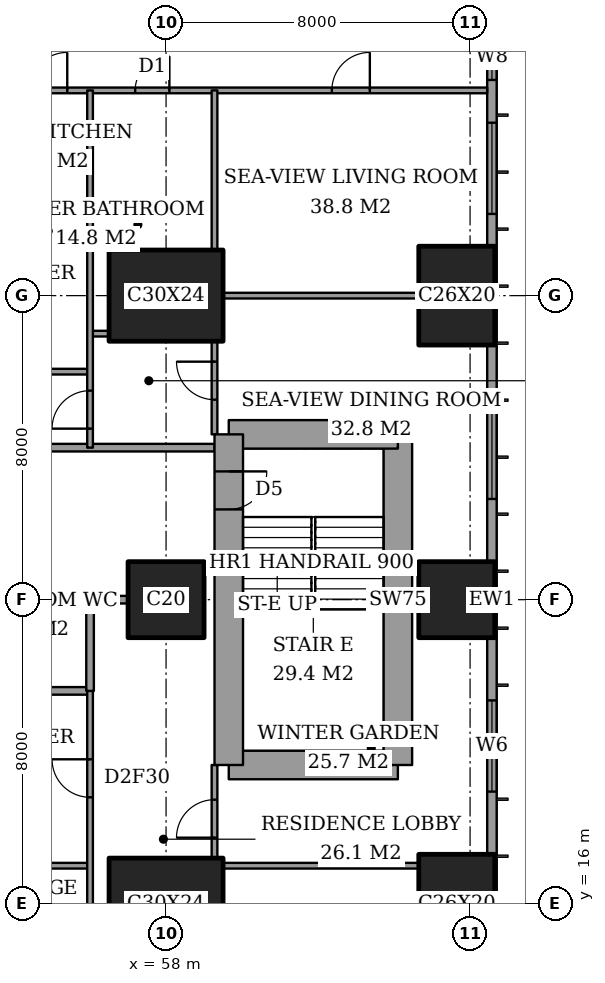
"""IFC4 building model, lengths in metres.
Left out: names, types, materials, properties, quantities, classifications, styles, units other than length and angle.
Written with IfcOpenShell. Run it as: python <this file> out.ifc"""

import sys

from ifc_helpers import new_model, si_unit, direction, frame, frame_2d, origin, origin_2d, place, context, subcontext, project, spatial, rectangle, extrude, element, fill, save


model = new_model("IFC4")
c1 = context("Model", 3, precision=1e-05, world=origin(), true_north=direction((0.0, 1.0)))
c2 = subcontext(c1, "Body", "Model", "MODEL_VIEW")
j1 = project(units=[si_unit("LENGTHUNIT", "METRE"), si_unit("PLANEANGLEUNIT", "RADIAN")], contexts=[c1])
p1 = place(None, origin())
s1 = spatial("IfcSite", under=j1, at=p1, CompositionType="ELEMENT")
p2 = place(p1, origin())
s2 = spatial("IfcBuilding", under=s1, at=p2, CompositionType="ELEMENT")
p3 = place(p2, frame((0.0, 0.0, 83.6)))
s3 = spatial("IfcBuildingStorey", under=s2, at=p3, CompositionType="ELEMENT", Elevation=83.6)
p4 = place(p3, frame((58.0, 16.0, 0.0), z_axis=(0.0, 0.0, 1.0), x_axis=(1.0, 0.0, 0.0)))
e1 = element("IfcColumn", 1, at=p4, inside=s3, PredefinedType="COLUMN", context=c2, shape_type="SweptSolid", body=[
    extrude(rectangle(XDim=3.0, YDim=2.4, at=origin_2d()), origin(), (0.0, 0.0, 1.0), 3.6),
])
p5 = place(p3, frame((58.0, 24.0, 0.0), z_axis=(0.0, 0.0, 1.0), x_axis=(1.0, 0.0, 0.0)))
e2 = element("IfcColumn", 2, at=p5, inside=s3, PredefinedType="COLUMN", context=c2, shape_type="SweptSolid", body=[
    extrude(rectangle(XDim=2.0, YDim=2.0, at=origin_2d()), origin(), (0.0, 0.0, 1.0), 3.6),
])
p6 = place(p3, frame((58.0, 32.0, 0.0), z_axis=(0.0, 0.0, 1.0), x_axis=(1.0, 0.0, 0.0)))
e3 = element("IfcColumn", 3, at=p6, inside=s3, PredefinedType="COLUMN", context=c2, shape_type="SweptSolid", body=[
    extrude(rectangle(XDim=3.0, YDim=2.4, at=origin_2d()), origin(), (0.0, 0.0, 1.0), 3.6),
])
p7 = place(p3, frame((65.65, 16.0, 0.0), z_axis=(0.0, 0.0, 1.0), x_axis=(0.0, 1.0, 0.0)))
e4 = element("IfcColumn", 4, at=p7, inside=s3, PredefinedType="COLUMN", context=c2, shape_type="SweptSolid", body=[
    extrude(rectangle(XDim=2.6, YDim=2.0, at=origin_2d()), origin(), (0.0, 0.0, 1.0), 3.6),
])
p8 = place(p3, frame((65.65, 24.0, 0.0), z_axis=(0.0, 0.0, 1.0), x_axis=(1.0, 0.0, 0.0)))
e5 = element("IfcColumn", 5, at=p8, inside=s3, PredefinedType="COLUMN", context=c2, shape_type="SweptSolid", body=[
    extrude(rectangle(XDim=2.0, YDim=2.0, at=origin_2d()), origin(), (0.0, 0.0, 1.0), 3.6),
])
p9 = place(p3, frame((65.65, 32.0, 0.0), z_axis=(0.0, 0.0, 1.0), x_axis=(0.0, 1.0, 0.0)))
e6 = element("IfcColumn", 6, at=p9, inside=s3, PredefinedType="COLUMN", context=c2, shape_type="SweptSolid", body=[
    extrude(rectangle(XDim=2.6, YDim=2.0, at=origin_2d()), origin(), (0.0, 0.0, 1.0), 3.6),
])
p10 = place(p3, frame((59.65, 19.65, 0.0), z_axis=(0.0, 0.0, 1.0), x_axis=(1.0, 0.0, 0.0)))
e7 = element("IfcWall", 7, at=p10, inside=s3, PredefinedType="SHEAR", context=c2, shape_type="SweptSolid", body=[
    extrude(rectangle(XDim=4.45, YDim=0.75, at=frame_2d((2.225, 0.0))), origin(), (0.0, 0.0, 1.0), 3.6),
])
p11 = place(p3, frame((64.1, 19.65, 0.0), z_axis=(0.0, 0.0, 1.0), x_axis=(0.0, 1.0, 0.0)))
e8 = element("IfcWall", 8, at=p11, inside=s3, PredefinedType="SHEAR", context=c2, shape_type="SweptSolid", body=[
    extrude(rectangle(XDim=8.7, YDim=0.75, at=frame_2d((4.35, 0.0))), origin(), (0.0, 0.0, 1.0), 3.6),
])
p12 = place(p3, frame((64.1, 28.35, 0.0), z_axis=(0.0, 0.0, 1.0), x_axis=(-1.0, 0.0, 0.0)))
e9 = element("IfcWall", 9, at=p12, inside=s3, PredefinedType="SHEAR", context=c2, shape_type="SweptSolid", body=[
    extrude(rectangle(XDim=4.45, YDim=0.75, at=frame_2d((2.225, 0.0))), origin(), (0.0, 0.0, 1.0), 3.6),
])
p13 = place(p3, frame((59.65, 28.35, 0.0), z_axis=(0.0, 0.0, 1.0), x_axis=(0.0, -1.0, 0.0)))
e10 = element("IfcWall", 10, at=p13, inside=s3, PredefinedType="SHEAR", context=c2, shape_type="SweptSolid", body=[
    extrude(rectangle(XDim=8.7, YDim=0.75, at=frame_2d((4.35, 0.0))), origin(), (0.0, 0.0, 1.0), 3.6),
])
p14 = place(p13, frame((0.975, 0.0, 0.0)))
e11 = element("IfcOpeningElement", 11, at=p14, cuts=e10, PredefinedType="OPENING", context=c2, shape_type="SweptSolid", body=[
    extrude(rectangle(XDim=1.0, YDim=2.1, at=frame_2d((0.5, 1.05))), frame((0.0, 0.385, 0.0), z_axis=(0.0, -1.0, 0.0), x_axis=(1.0, 0.0, 0.0)), (0.0, 0.0, 1.0), 0.77),
])
p15 = place(p3, frame((66.575, 3.175, 0.0), z_axis=(0.0, 0.0, 1.0), x_axis=(0.0, 1.0, 0.0)))
e12 = element("IfcWall", 12, at=p15, inside=s3, PredefinedType="SOLIDWALL", context=c2, shape_type="SweptSolid", body=[
    extrude(rectangle(XDim=41.65, YDim=0.25, at=frame_2d((20.825, 0.0))), origin(), (0.0, 0.0, 1.0), 3.6),
])
p16 = place(p15, frame((0.775, 0.0, 0.6)))
e13 = element("IfcOpeningElement", 13, at=p16, cuts=e12, PredefinedType="OPENING", context=c2, shape_type="SweptSolid", body=[
    extrude(rectangle(XDim=2.4, YDim=2.0, at=frame_2d((1.2, 1.0))), frame((0.0, 0.135, 0.0), z_axis=(0.0, -1.0, 0.0), x_axis=(1.0, 0.0, 0.0)), (0.0, 0.0, 1.0), 0.27),
])
p17 = place(p15, frame((6.1, 0.0, 0.6)))
e14 = element("IfcOpeningElement", 14, at=p17, cuts=e12, PredefinedType="OPENING", context=c2, shape_type="SweptSolid", body=[
    extrude(rectangle(XDim=1.2, YDim=2.0, at=frame_2d((0.6, 1.0))), frame((0.0, 0.135, 0.0), z_axis=(0.0, -1.0, 0.0), x_axis=(1.0, 0.0, 0.0)), (0.0, 0.0, 1.0), 0.27),
])
p18 = place(p15, frame((8.275, 0.0, 0.6)))
e15 = element("IfcOpeningElement", 15, at=p18, cuts=e12, PredefinedType="OPENING", context=c2, shape_type="SweptSolid", body=[
    extrude(rectangle(XDim=2.4, YDim=2.0, at=frame_2d((1.2, 1.0))), frame((0.0, 0.135, 0.0), z_axis=(0.0, -1.0, 0.0), x_axis=(1.0, 0.0, 0.0)), (0.0, 0.0, 1.0), 0.27),
])
p19 = place(p15, frame((15.775, 0.0, 0.6)))
e16 = element("IfcOpeningElement", 16, at=p19, cuts=e12, PredefinedType="OPENING", context=c2, shape_type="SweptSolid", body=[
    extrude(rectangle(XDim=2.4, YDim=2.0, at=frame_2d((1.2, 1.0))), frame((0.0, 0.135, 0.0), z_axis=(0.0, -1.0, 0.0), x_axis=(1.0, 0.0, 0.0)), (0.0, 0.0, 1.0), 0.27),
])
p20 = place(p15, frame((23.475, 0.0, 0.6)))
e17 = element("IfcOpeningElement", 17, at=p20, cuts=e12, PredefinedType="OPENING", context=c2, shape_type="SweptSolid", body=[
    extrude(rectangle(XDim=2.4, YDim=2.0, at=frame_2d((1.2, 1.0))), frame((0.0, 0.135, 0.0), z_axis=(0.0, -1.0, 0.0), x_axis=(1.0, 0.0, 0.0)), (0.0, 0.0, 1.0), 0.27),
])
p21 = place(p15, frame((30.975, 0.0, 0.6)))
e18 = element("IfcOpeningElement", 18, at=p21, cuts=e12, PredefinedType="OPENING", context=c2, shape_type="SweptSolid", body=[
    extrude(rectangle(XDim=2.4, YDim=2.0, at=frame_2d((1.2, 1.0))), frame((0.0, 0.135, 0.0), z_axis=(0.0, -1.0, 0.0), x_axis=(1.0, 0.0, 0.0)), (0.0, 0.0, 1.0), 0.27),
])
p22 = place(p15, frame((34.5, 0.0, 0.6)))
e19 = element("IfcOpeningElement", 19, at=p22, cuts=e12, PredefinedType="OPENING", context=c2, shape_type="SweptSolid", body=[
    extrude(rectangle(XDim=1.2, YDim=2.0, at=frame_2d((0.6, 1.0))), frame((0.0, 0.135, 0.0), z_axis=(0.0, -1.0, 0.0), x_axis=(1.0, 0.0, 0.0)), (0.0, 0.0, 1.0), 0.27),
])
p23 = place(p15, frame((38.475, 0.0, 0.6)))
e20 = element("IfcOpeningElement", 20, at=p23, cuts=e12, PredefinedType="OPENING", context=c2, shape_type="SweptSolid", body=[
    extrude(rectangle(XDim=2.4, YDim=2.0, at=frame_2d((1.2, 1.0))), frame((0.0, 0.135, 0.0), z_axis=(0.0, -1.0, 0.0), x_axis=(1.0, 0.0, 0.0)), (0.0, 0.0, 1.0), 0.27),
])
p24 = place(p3, frame((51.6, 17.0, 0.0), z_axis=(0.0, 0.0, 1.0), x_axis=(1.0, 0.0, 0.0)))
e21 = element("IfcWall", 21, at=p24, inside=s3, PredefinedType="PARTITIONING", context=c2, shape_type="SweptSolid", body=[
    extrude(rectangle(XDim=4.4, YDim=0.15, at=frame_2d((2.2, 0.0))), origin(), (0.0, 0.0, 1.0), 3.35),
])
p25 = place(p24, frame((0.6, 0.0, 0.0)))
e22 = element("IfcOpeningElement", 22, at=p25, cuts=e21, PredefinedType="OPENING", context=c2, shape_type="SweptSolid", body=[
    extrude(rectangle(XDim=1.0, YDim=2.1, at=frame_2d((0.5, 1.05))), frame((0.0, 0.085, 0.0), z_axis=(0.0, -1.0, 0.0), x_axis=(1.0, 0.0, 0.0)), (0.0, 0.0, 1.0), 0.17),
])
p26 = place(p3, frame((59.5, 17.0, 0.0), z_axis=(0.0, 0.0, 1.0), x_axis=(1.0, 0.0, 0.0)))
e23 = element("IfcWall", 23, at=p26, inside=s3, PredefinedType="PARTITIONING", context=c2, shape_type="SweptSolid", body=[
    extrude(rectangle(XDim=5.15, YDim=0.15, at=frame_2d((2.575, 0.0))), origin(), (0.0, 0.0, 1.0), 3.35),
])
p27 = place(p3, frame((51.2, 21.6, 0.0), z_axis=(0.0, 0.0, 1.0), x_axis=(1.0, 0.0, 0.0)))
e24 = element("IfcWall", 24, at=p27, inside=s3, PredefinedType="PARTITIONING", context=c2, shape_type="SweptSolid", body=[
    extrude(rectangle(XDim=4.8, YDim=0.2, at=frame_2d((2.4, 0.0))), origin(), (0.0, 0.0, 1.0), 3.35),
])
p28 = place(p27, frame((1.95, 0.0, 0.0)))
e25 = element("IfcOpeningElement", 25, at=p28, cuts=e24, PredefinedType="OPENING", context=c2, shape_type="SweptSolid", body=[
    extrude(rectangle(XDim=0.9, YDim=2.1, at=frame_2d((0.45, 1.05))), frame((0.0, 0.11, 0.0), z_axis=(0.0, -1.0, 0.0), x_axis=(1.0, 0.0, 0.0)), (0.0, 0.0, 1.0), 0.22),
])
p29 = place(p3, frame((51.0, 24.0, 0.0), z_axis=(0.0, 0.0, 1.0), x_axis=(1.0, 0.0, 0.0)))
e26 = element("IfcWall", 26, at=p29, inside=s3, PredefinedType="PARTITIONING", context=c2, shape_type="SweptSolid", body=[
    extrude(rectangle(XDim=6.0, YDim=0.2, at=frame_2d((3.0, 0.0))), origin(), (0.0, 0.0, 1.0), 3.35),
])
p30 = place(p3, frame((42.0, 28.0, 0.0), z_axis=(0.0, 0.0, 1.0), x_axis=(1.0, 0.0, 0.0)))
e27 = element("IfcWall", 27, at=p30, inside=s3, PredefinedType="PARTITIONING", context=c2, shape_type="SweptSolid", body=[
    extrude(rectangle(XDim=17.275, YDim=0.2, at=frame_2d((8.637, 0.0))), origin(), (0.0, 0.0, 1.0), 3.35),
])
p31 = place(p30, frame((9.4, 0.0, 0.0)))
e28 = element("IfcOpeningElement", 28, at=p31, cuts=e27, PredefinedType="OPENING", context=c2, shape_type="SweptSolid", body=[
    extrude(rectangle(XDim=1.2, YDim=2.4, at=frame_2d((0.6, 1.2))), frame((0.0, 0.11, 0.0), z_axis=(0.0, -1.0, 0.0), x_axis=(1.0, 0.0, 0.0)), (0.0, 0.0, 1.0), 0.22),
])
p32 = place(p3, frame((51.6, 30.0, 0.0), z_axis=(0.0, 0.0, 1.0), x_axis=(1.0, 0.0, 0.0)))
e29 = element("IfcWall", 29, at=p32, inside=s3, PredefinedType="PARTITIONING", context=c2, shape_type="SweptSolid", body=[
    extrude(rectangle(XDim=4.4, YDim=0.15, at=frame_2d((2.2, 0.0))), origin(), (0.0, 0.0, 1.0), 3.35),
])
p33 = place(p32, frame((0.6, 0.0, 0.0)))
e30 = element("IfcOpeningElement", 30, at=p33, cuts=e29, PredefinedType="OPENING", context=c2, shape_type="SweptSolid", body=[
    extrude(rectangle(XDim=1.0, YDim=2.1, at=frame_2d((0.5, 1.05))), frame((0.0, 0.085, 0.0), z_axis=(0.0, -1.0, 0.0), x_axis=(1.0, 0.0, 0.0)), (0.0, 0.0, 1.0), 0.17),
])
p34 = place(p3, frame((56.0, 31.0, 0.0), z_axis=(0.0, 0.0, 1.0), x_axis=(1.0, 0.0, 0.0)))
e31 = element("IfcWall", 31, at=p34, inside=s3, PredefinedType="PARTITIONING", context=c2, shape_type="SweptSolid", body=[
    extrude(rectangle(XDim=0.5, YDim=0.15, at=frame_2d((0.25, 0.0))), origin(), (0.0, 0.0, 1.0), 3.35),
])
p35 = place(p3, frame((59.5, 32.0, 0.0), z_axis=(0.0, 0.0, 1.0), x_axis=(1.0, 0.0, 0.0)))
e32 = element("IfcWall", 32, at=p35, inside=s3, PredefinedType="PARTITIONING", context=c2, shape_type="SweptSolid", body=[
    extrude(rectangle(XDim=5.15, YDim=0.15, at=frame_2d((2.575, 0.0))), origin(), (0.0, 0.0, 1.0), 2.634),
])
p36 = place(p3, frame((41.439, 37.4, 0.0), z_axis=(0.0, 0.0, 1.0), x_axis=(1.0, 0.0, 0.0)))
e33 = element("IfcWall", 33, at=p36, inside=s3, PredefinedType="PARTITIONING", context=c2, shape_type="SweptSolid", body=[
    extrude(rectangle(XDim=25.011, YDim=0.15, at=frame_2d((12.505, 0.0))), origin(), (0.0, 0.0, 1.0), 3.35),
])
p37 = place(p36, frame((10.761, 0.0, 0.0)))
e34 = element("IfcOpeningElement", 34, at=p37, cuts=e33, PredefinedType="OPENING", context=c2, shape_type="SweptSolid", body=[
    extrude(rectangle(XDim=1.0, YDim=2.1, at=frame_2d((0.5, 1.05))), frame((0.0, 0.085, 0.0), z_axis=(0.0, -1.0, 0.0), x_axis=(1.0, 0.0, 0.0)), (0.0, 0.0, 1.0), 0.17),
])
p38 = place(p36, frame((20.924, 0.0, 0.0)))
e35 = element("IfcOpeningElement", 35, at=p38, cuts=e33, PredefinedType="OPENING", context=c2, shape_type="SweptSolid", body=[
    extrude(rectangle(XDim=1.0, YDim=2.1, at=frame_2d((0.5, 1.05))), frame((0.0, 0.085, 0.0), z_axis=(0.0, -1.0, 0.0), x_axis=(1.0, 0.0, 0.0)), (0.0, 0.0, 1.0), 0.17),
])
p39 = place(p36, frame((15.749, 0.0, 0.0)))
e36 = element("IfcOpeningElement", 36, at=p39, cuts=e33, PredefinedType="OPENING", context=c2, shape_type="SweptSolid", body=[
    extrude(rectangle(XDim=0.9, YDim=2.1, at=frame_2d((0.45, 1.05))), frame((0.0, 0.085, 0.0), z_axis=(0.0, -1.0, 0.0), x_axis=(1.0, 0.0, 0.0)), (0.0, 0.0, 1.0), 0.17),
])
p40 = place(p36, frame((12.961, 0.0, 0.0)))
e37 = element("IfcOpeningElement", 37, at=p40, cuts=e33, PredefinedType="OPENING", context=c2, shape_type="SweptSolid", body=[
    extrude(rectangle(XDim=1.0, YDim=2.1, at=frame_2d((0.5, 1.05))), frame((0.0, 0.085, 0.0), z_axis=(0.0, -1.0, 0.0), x_axis=(1.0, 0.0, 0.0)), (0.0, 0.0, 1.0), 0.17),
])
p41 = place(p36, frame((7.861, 0.0, 0.0)))
e38 = element("IfcOpeningElement", 38, at=p41, cuts=e33, PredefinedType="OPENING", context=c2, shape_type="SweptSolid", body=[
    extrude(rectangle(XDim=1.0, YDim=2.1, at=frame_2d((0.5, 1.05))), frame((0.0, 0.085, 0.0), z_axis=(0.0, -1.0, 0.0), x_axis=(1.0, 0.0, 0.0)), (0.0, 0.0, 1.0), 0.17),
])
p42 = place(p36, frame((2.836, 0.0, 0.0)))
e39 = element("IfcOpeningElement", 39, at=p42, cuts=e33, PredefinedType="OPENING", context=c2, shape_type="SweptSolid", body=[
    extrude(rectangle(XDim=1.0, YDim=2.1, at=frame_2d((0.5, 1.05))), frame((0.0, 0.085, 0.0), z_axis=(0.0, -1.0, 0.0), x_axis=(1.0, 0.0, 0.0)), (0.0, 0.0, 1.0), 0.17),
])
p43 = place(p3, frame((56.0, 21.6, 0.0), z_axis=(0.0, 0.0, 1.0), x_axis=(0.0, 1.0, 0.0)))
e40 = element("IfcWall", 40, at=p43, inside=s3, PredefinedType="PARTITIONING", context=c2, shape_type="SweptSolid", body=[
    extrude(rectangle(XDim=2.4, YDim=0.2, at=frame_2d((1.2, 0.0))), origin(), (0.0, 0.0, 1.0), 3.35),
])
p44 = place(p3, frame((56.0, 10.6, 0.0), z_axis=(0.0, 0.0, 1.0), x_axis=(0.0, 1.0, 0.0)))
e41 = element("IfcWall", 41, at=p44, inside=s3, PredefinedType="PARTITIONING", context=c2, shape_type="SweptSolid", body=[
    extrude(rectangle(XDim=11.0, YDim=0.15, at=frame_2d((5.5, 0.0))), origin(), (0.0, 0.0, 1.0), 3.35),
])
p45 = place(p44, frame((8.2, 0.0, 0.0)))
e42 = element("IfcOpeningElement", 42, at=p45, cuts=e41, PredefinedType="OPENING", context=c2, shape_type="SweptSolid", body=[
    extrude(rectangle(XDim=1.0, YDim=2.1, at=frame_2d((0.5, 1.05))), frame((0.0, 0.085, 0.0), z_axis=(0.0, -1.0, 0.0), x_axis=(1.0, 0.0, 0.0)), (0.0, 0.0, 1.0), 0.17),
])
p46 = place(p3, frame((56.0, 28.0, 0.0), z_axis=(0.0, 0.0, 1.0), x_axis=(0.0, 1.0, 0.0)))
e43 = element("IfcWall", 43, at=p46, inside=s3, PredefinedType="PARTITIONING", context=c2, shape_type="SweptSolid", body=[
    extrude(rectangle(XDim=9.4, YDim=0.15, at=frame_2d((4.7, 0.0))), origin(), (0.0, 0.0, 1.0), 3.35),
])
p47 = place(p46, frame((0.5, 0.0, 0.0)))
e44 = element("IfcOpeningElement", 44, at=p47, cuts=e43, PredefinedType="OPENING", context=c2, shape_type="SweptSolid", body=[
    extrude(rectangle(XDim=1.0, YDim=2.1, at=frame_2d((0.5, 1.05))), frame((0.0, 0.085, 0.0), z_axis=(0.0, -1.0, 0.0), x_axis=(1.0, 0.0, 0.0)), (0.0, 0.0, 1.0), 0.17),
])
p48 = place(p3, frame((59.275, 17.2, 0.0), z_axis=(0.0, 0.0, 1.0), x_axis=(0.0, 1.0, 0.0)))
e45 = element("IfcWall", 45, at=p48, inside=s3, PredefinedType="PARTITIONING", context=c2, shape_type="SweptSolid", body=[
    extrude(rectangle(XDim=2.45, YDim=0.15, at=frame_2d((1.225, 0.0))), origin(), (0.0, 0.0, 1.0), 3.35),
])
p49 = place(p48, frame((0.538, 0.0, 0.0)))
e46 = element("IfcOpeningElement", 46, at=p49, cuts=e45, PredefinedType="OPENING", context=c2, shape_type="SweptSolid", body=[
    extrude(rectangle(XDim=1.0, YDim=2.1, at=frame_2d((0.5, 1.05))), frame((0.0, 0.085, 0.0), z_axis=(0.0, -1.0, 0.0), x_axis=(1.0, 0.0, 0.0)), (0.0, 0.0, 1.0), 0.17),
])
p50 = place(p3, frame((59.275, 28.35, 0.0), z_axis=(0.0, 0.0, 1.0), x_axis=(0.0, 1.0, 0.0)))
e47 = element("IfcWall", 47, at=p50, inside=s3, PredefinedType="PARTITIONING", context=c2, shape_type="SweptSolid", body=[
    extrude(rectangle(XDim=2.45, YDim=0.15, at=frame_2d((1.225, 0.0))), origin(), (0.0, 0.0, 1.0), 3.35),
])
p51 = place(p50, frame((0.913, 0.0, 0.0)))
e48 = element("IfcOpeningElement", 48, at=p51, cuts=e47, PredefinedType="OPENING", context=c2, shape_type="SweptSolid", body=[
    extrude(rectangle(XDim=1.0, YDim=2.1, at=frame_2d((0.5, 1.05))), frame((0.0, 0.085, 0.0), z_axis=(0.0, -1.0, 0.0), x_axis=(1.0, 0.0, 0.0)), (0.0, 0.0, 1.0), 0.17),
])
p52 = place(p3, frame((59.275, 33.2, 0.0), z_axis=(0.0, 0.0, 1.0), x_axis=(0.0, 1.0, 0.0)))
e49 = element("IfcWall", 49, at=p52, inside=s3, PredefinedType="PARTITIONING", context=c2, shape_type="SweptSolid", body=[
    extrude(rectangle(XDim=4.2, YDim=0.15, at=frame_2d((2.1, 0.0))), origin(), (0.0, 0.0, 1.0), 3.35),
])
p53 = place(p19, origin())
e50 = element("IfcWindow", 50, at=p53, inside=s3, PartitioningType="SINGLE_PANEL", PredefinedType="WINDOW", context=c2, shape_type="SweptSolid", body=[
    extrude(rectangle(XDim=2.4, YDim=2.0, at=frame_2d((1.2, 1.0))), frame((0.0, 0.03, 0.0), z_axis=(0.0, -1.0, 0.0), x_axis=(1.0, 0.0, 0.0)), (0.0, 0.0, 1.0), 0.06),
])
fill(e16, e50)
p54 = place(p20, origin())
e51 = element("IfcWindow", 51, at=p54, inside=s3, PartitioningType="SINGLE_PANEL", PredefinedType="WINDOW", context=c2, shape_type="SweptSolid", body=[
    extrude(rectangle(XDim=2.4, YDim=2.0, at=frame_2d((1.2, 1.0))), frame((0.0, 0.03, 0.0), z_axis=(0.0, -1.0, 0.0), x_axis=(1.0, 0.0, 0.0)), (0.0, 0.0, 1.0), 0.06),
])
fill(e17, e51)
p55 = place(p21, origin())
e52 = element("IfcWindow", 52, at=p55, inside=s3, PartitioningType="SINGLE_PANEL", PredefinedType="WINDOW", context=c2, shape_type="SweptSolid", body=[
    extrude(rectangle(XDim=2.4, YDim=2.0, at=frame_2d((1.2, 1.0))), frame((0.0, 0.03, 0.0), z_axis=(0.0, -1.0, 0.0), x_axis=(1.0, 0.0, 0.0)), (0.0, 0.0, 1.0), 0.06),
])
fill(e18, e52)
p56 = place(p22, origin())
e53 = element("IfcWindow", 53, at=p56, inside=s3, PartitioningType="SINGLE_PANEL", PredefinedType="WINDOW", context=c2, shape_type="SweptSolid", body=[
    extrude(rectangle(XDim=1.2, YDim=2.0, at=frame_2d((0.6, 1.0))), frame((0.0, 0.03, 0.0), z_axis=(0.0, -1.0, 0.0), x_axis=(1.0, 0.0, 0.0)), (0.0, 0.0, 1.0), 0.06),
])
fill(e19, e53)
p57 = place(p49, origin())
e54 = element("IfcDoor", 54, at=p57, inside=s3, OperationType="SINGLE_SWING_RIGHT", PredefinedType="DOOR", context=c2, shape_type="SweptSolid", body=[
    extrude(rectangle(XDim=1.0, YDim=2.1, at=frame_2d((0.5, 1.05))), frame((0.0, 0.025, 0.0), z_axis=(0.0, -1.0, 0.0), x_axis=(1.0, 0.0, 0.0)), (0.0, 0.0, 1.0), 0.05),
])
fill(e46, e54)
p58 = place(p45, origin())
e55 = element("IfcDoor", 55, at=p58, inside=s3, OperationType="SINGLE_SWING_LEFT", PredefinedType="DOOR", context=c2, shape_type="SweptSolid", body=[
    extrude(rectangle(XDim=1.0, YDim=2.1, at=frame_2d((0.5, 1.05))), frame((0.0, 0.025, 0.0), z_axis=(0.0, -1.0, 0.0), x_axis=(1.0, 0.0, 0.0)), (0.0, 0.0, 1.0), 0.05),
])
fill(e42, e55)
p59 = place(p38, origin())
e56 = element("IfcDoor", 56, at=p59, inside=s3, OperationType="SINGLE_SWING_LEFT", PredefinedType="DOOR", context=c2, shape_type="SweptSolid", body=[
    extrude(rectangle(XDim=1.0, YDim=2.1, at=frame_2d((0.5, 1.05))), frame((0.0, 0.025, 0.0), z_axis=(0.0, -1.0, 0.0), x_axis=(1.0, 0.0, 0.0)), (0.0, 0.0, 1.0), 0.05),
])
fill(e35, e56)
p60 = place(p51, origin())
e57 = element("IfcDoor", 57, at=p60, inside=s3, OperationType="SINGLE_SWING_LEFT", PredefinedType="DOOR", context=c2, shape_type="SweptSolid", body=[
    extrude(rectangle(XDim=1.0, YDim=2.1, at=frame_2d((0.5, 1.05))), frame((0.0, 0.025, 0.0), z_axis=(0.0, -1.0, 0.0), x_axis=(1.0, 0.0, 0.0)), (0.0, 0.0, 1.0), 0.05),
])
fill(e48, e57)
p61 = place(p39, origin())
e58 = element("IfcDoor", 58, at=p61, inside=s3, OperationType="SINGLE_SWING_LEFT", PredefinedType="DOOR", context=c2, shape_type="SweptSolid", body=[
    extrude(rectangle(XDim=0.9, YDim=2.1, at=frame_2d((0.45, 1.05))), frame((0.0, 0.025, 0.0), z_axis=(0.0, -1.0, 0.0), x_axis=(1.0, 0.0, 0.0)), (0.0, 0.0, 1.0), 0.05),
])
fill(e36, e58)
p62 = place(p47, origin())
e59 = element("IfcDoor", 59, at=p62, inside=s3, OperationType="SINGLE_SWING_RIGHT", PredefinedType="DOOR", context=c2, shape_type="SweptSolid", body=[
    extrude(rectangle(XDim=1.0, YDim=2.1, at=frame_2d((0.5, 1.05))), frame((0.0, 0.025, 0.0), z_axis=(0.0, -1.0, 0.0), x_axis=(1.0, 0.0, 0.0)), (0.0, 0.0, 1.0), 0.05),
])
fill(e44, e59)
p63 = place(p40, origin())
e60 = element("IfcDoor", 60, at=p63, inside=s3, OperationType="SINGLE_SWING_LEFT", PredefinedType="DOOR", context=c2, shape_type="SweptSolid", body=[
    extrude(rectangle(XDim=1.0, YDim=2.1, at=frame_2d((0.5, 1.05))), frame((0.0, 0.025, 0.0), z_axis=(0.0, -1.0, 0.0), x_axis=(1.0, 0.0, 0.0)), (0.0, 0.0, 1.0), 0.05),
])
fill(e37, e60)
p64 = place(p14, origin())
e61 = element("IfcDoor", 61, at=p64, inside=s3, OperationType="SINGLE_SWING_RIGHT", PredefinedType="DOOR", context=c2, shape_type="SweptSolid", body=[
    extrude(rectangle(XDim=1.0, YDim=2.1, at=frame_2d((0.5, 1.05))), frame((0.0, 0.025, 0.0), z_axis=(0.0, -1.0, 0.0), x_axis=(1.0, 0.0, 0.0)), (0.0, 0.0, 1.0), 0.05),
])
fill(e11, e61)
save(model, sys.argv[1])
